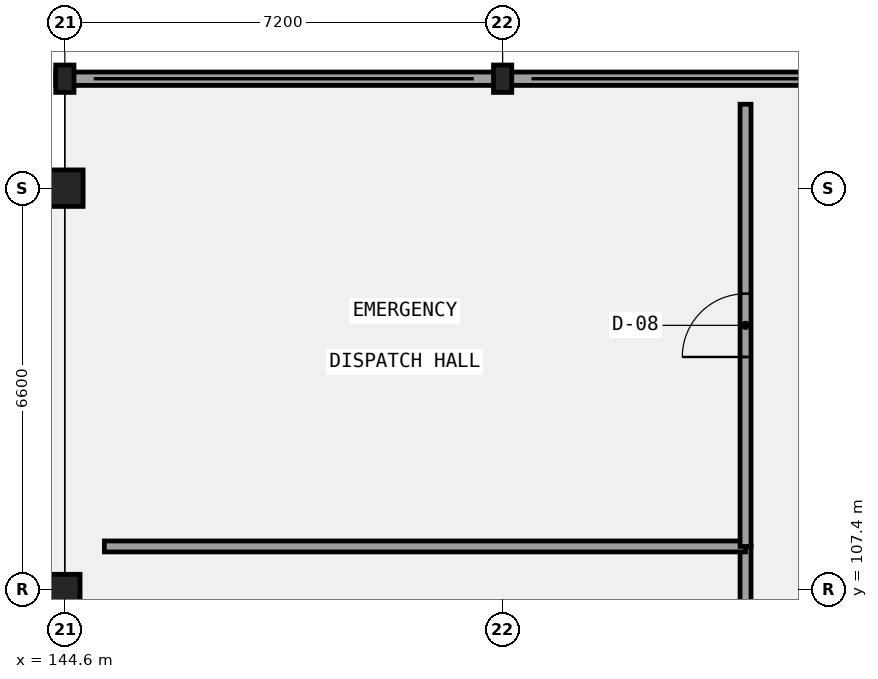
"""IFC4 building model, lengths in metres.
Left out: names, types, materials, properties, quantities, classifications, styles, units other than length and angle.
Written with IfcOpenShell. Run it as: python <this file> out.ifc"""

import sys

from ifc_helpers import new_model, si_unit, direction, frame, frame_2d, origin, origin_2d, place, context, subcontext, project, spatial, rectangle, i_section, extrude, element, fill, save


model = new_model("IFC4")
c1 = context("Model", 3, precision=1e-05, world=origin(), true_north=direction((0.0, 1.0)))
c2 = subcontext(c1, "Body", "Model", "MODEL_VIEW")
j1 = project(units=[si_unit("LENGTHUNIT", "METRE"), si_unit("PLANEANGLEUNIT", "RADIAN")], contexts=[c1])
p1 = place(None, origin())
s1 = spatial("IfcSite", under=j1, at=p1, CompositionType="ELEMENT")
p2 = place(p1, origin())
s2 = spatial("IfcBuilding", under=s1, at=p2, CompositionType="ELEMENT")
p3 = place(p2, frame((0.0, 0.0, 26.4)))
s3 = spatial("IfcBuildingStorey", under=s2, at=p3, CompositionType="ELEMENT", Elevation=26.4)
p4 = place(p3, frame((144.6, 107.4, 0.0), z_axis=(0.0, 0.0, 1.0), x_axis=(1.0, 0.0, 0.0)))
e1 = element("IfcColumn", 1, at=p4, inside=s3, PredefinedType="COLUMN", context=c2, shape_type="SweptSolid", body=[
    extrude(rectangle(XDim=0.5, YDim=0.5, at=origin_2d()), origin(), (0.0, 0.0, 1.0), 4.5),
])
p5 = place(p3, frame((144.6, 114.0, 0.0), z_axis=(0.0, 0.0, 1.0), x_axis=(1.0, 0.0, 0.0)))
e2 = element("IfcColumn", 2, at=p5, inside=s3, PredefinedType="COLUMN", context=c2, shape_type="SweptSolid", body=[
    extrude(rectangle(XDim=0.6, YDim=0.6, at=origin_2d()), origin(), (0.0, 0.0, 1.0), 4.5),
])
for number, where, z_axis, x_axis in (
    (3, (151.8, 115.8, 0.0), (0.0, 0.0, 1.0), (1.0, 0.0, 0.0)),
    (4, (144.6, 115.8, 0.0), (0.0, 0.0, 1.0), (1.0, 0.0, 0.0)),
):
    element("IfcColumn", number, at=place(p3, frame(where, z_axis=z_axis, x_axis=x_axis)), inside=s3, PredefinedType="COLUMN", context=c2, shape_type="SweptSolid", body=[
        extrude(i_section(OverallWidth=0.3, OverallDepth=0.45, WebThickness=0.014, FlangeThickness=0.026, FilletRadius=0.027, at=origin_2d()), origin(), (0.0, 0.0, 1.0), 4.5),
    ])
p6 = place(p3, frame((168.15, 115.8, 0.0), z_axis=(0.0, 0.0, 1.0), x_axis=(-1.0, 0.0, 0.0)))
e5 = element("IfcWall", 5, at=p6, inside=s3, PredefinedType="PARAPET", context=c2, shape_type="SweptSolid", body=[
    extrude(rectangle(XDim=23.7, YDim=0.22, at=frame_2d((11.85, 0.0))), origin(), (0.0, 0.0, 1.0), 0.45),
])
p7 = place(p3, frame((144.75, 114.0, 0.0), z_axis=(0.0, 0.0, 1.0), x_axis=(-1.0, 0.0, 0.0)))
e6 = element("IfcWall", 6, at=p7, inside=s3, PredefinedType="SOLIDWALL", context=c2, shape_type="SweptSolid", body=[
    extrude(rectangle(XDim=36.3, YDim=0.3, at=frame_2d((18.15, 0.0))), origin(), (0.0, 0.0, 1.0), 3.47),
])
p8 = place(p7, frame((31.55, 0.0, 0.95)))
e7 = element("IfcOpeningElement", 7, at=p8, cuts=e6, PredefinedType="OPENING", context=c2, shape_type="SweptSolid", body=[
    extrude(rectangle(XDim=2.0, YDim=1.9, at=frame_2d((1.0, 0.95))), frame((0.0, 0.16, 0.0), z_axis=(0.0, -1.0, 0.0), x_axis=(1.0, 0.0, 0.0)), (0.0, 0.0, 1.0), 0.32),
])
p9 = place(p7, frame((24.35, 0.0, 0.95)))
e8 = element("IfcOpeningElement", 8, at=p9, cuts=e6, PredefinedType="OPENING", context=c2, shape_type="SweptSolid", body=[
    extrude(rectangle(XDim=2.0, YDim=2.15, at=frame_2d((1.0, 1.075))), frame((0.0, 0.16, 0.0), z_axis=(0.0, -1.0, 0.0), x_axis=(1.0, 0.0, 0.0)), (0.0, 0.0, 1.0), 0.32),
])
p10 = place(p7, frame((17.05, 0.0, 0.95)))
e9 = element("IfcOpeningElement", 9, at=p10, cuts=e6, PredefinedType="OPENING", context=c2, shape_type="SweptSolid", body=[
    extrude(rectangle(XDim=2.2, YDim=1.4, at=frame_2d((1.1, 0.7))), frame((0.0, 0.16, 0.0), z_axis=(0.0, -1.0, 0.0), x_axis=(1.0, 0.0, 0.0)), (0.0, 0.0, 1.0), 0.32),
])
p11 = place(p7, frame((9.85, 0.0, 0.95)))
e10 = element("IfcOpeningElement", 10, at=p11, cuts=e6, PredefinedType="OPENING", context=c2, shape_type="SweptSolid", body=[
    extrude(rectangle(XDim=2.2, YDim=1.65, at=frame_2d((1.1, 0.825))), frame((0.0, 0.16, 0.0), z_axis=(0.0, -1.0, 0.0), x_axis=(1.0, 0.0, 0.0)), (0.0, 0.0, 1.0), 0.32),
])
p12 = place(p7, frame((2.65, 0.0, 0.95)))
e11 = element("IfcOpeningElement", 11, at=p12, cuts=e6, PredefinedType="OPENING", context=c2, shape_type="SweptSolid", body=[
    extrude(rectangle(XDim=2.2, YDim=1.9, at=frame_2d((1.1, 0.95))), frame((0.0, 0.16, 0.0), z_axis=(0.0, -1.0, 0.0), x_axis=(1.0, 0.0, 0.0)), (0.0, 0.0, 1.0), 0.32),
])
p13 = place(p3, frame((155.795, 100.836, 0.0), z_axis=(0.0, 0.0, 1.0), x_axis=(0.0, 1.0, 0.0)))
e12 = element("IfcWall", 12, at=p13, inside=s3, PredefinedType="PARTITIONING", context=c2, shape_type="SweptSolid", body=[
    extrude(rectangle(XDim=7.272, YDim=0.18, at=frame_2d((3.636, 0.0))), origin(), (0.0, 0.0, 1.0), 4.22),
])
p14 = place(p13, frame((3.116, 0.0, 0.0)))
e13 = element("IfcOpeningElement", 13, at=p14, cuts=e12, PredefinedType="OPENING", context=c2, shape_type="SweptSolid", body=[
    extrude(rectangle(XDim=1.04, YDim=2.1, at=frame_2d((0.52, 1.05))), frame((0.0, 0.1, 0.0), z_axis=(0.0, -1.0, 0.0), x_axis=(1.0, 0.0, 0.0)), (0.0, 0.0, 1.0), 0.2),
])
p15 = place(p3, frame((145.25, 108.108, 0.0), z_axis=(0.0, 0.0, 1.0), x_axis=(1.0, 0.0, 0.0)))
e14 = element("IfcWall", 14, at=p15, inside=s3, PredefinedType="PARTITIONING", context=c2, shape_type="SweptSolid", body=[
    extrude(rectangle(XDim=10.545, YDim=0.18, at=frame_2d((5.272, 0.0))), origin(), (0.0, 0.0, 1.0), 4.22),
])
p16 = place(p3, frame((155.795, 108.108, 0.0), z_axis=(0.0, 0.0, 1.0), x_axis=(0.0, 1.0, 0.0)))
e15 = element("IfcWall", 15, at=p16, inside=s3, PredefinedType="PARTITIONING", context=c2, shape_type="SweptSolid", body=[
    extrude(rectangle(XDim=7.272, YDim=0.18, at=frame_2d((3.636, 0.0))), origin(), (0.0, 0.0, 1.0), 4.22),
])
p17 = place(p16, frame((3.116, 0.0, 0.0)))
e16 = element("IfcOpeningElement", 16, at=p17, cuts=e15, PredefinedType="OPENING", context=c2, shape_type="SweptSolid", body=[
    extrude(rectangle(XDim=1.04, YDim=2.22, at=frame_2d((0.52, 1.11))), frame((0.0, 0.1, 0.0), z_axis=(0.0, -1.0, 0.0), x_axis=(1.0, 0.0, 0.0)), (0.0, 0.0, 1.0), 0.2),
])
p18 = place(p17, frame((1.04, 0.0, 0.0), z_axis=(0.0, 0.0, 1.0), x_axis=(-1.0, 0.0, 0.0)))
e17 = element("IfcDoor", 17, at=p18, inside=s3, OperationType="SINGLE_SWING_LEFT", PredefinedType="DOOR", context=c2, shape_type="SweptSolid", body=[
    extrude(rectangle(XDim=1.04, YDim=2.22, at=frame_2d((0.52, 1.11))), frame((0.0, 0.025, 0.0), z_axis=(0.0, -1.0, 0.0), x_axis=(1.0, 0.0, 0.0)), (0.0, 0.0, 1.0), 0.05),
])
fill(e16, e17)
save(model, sys.argv[1])
